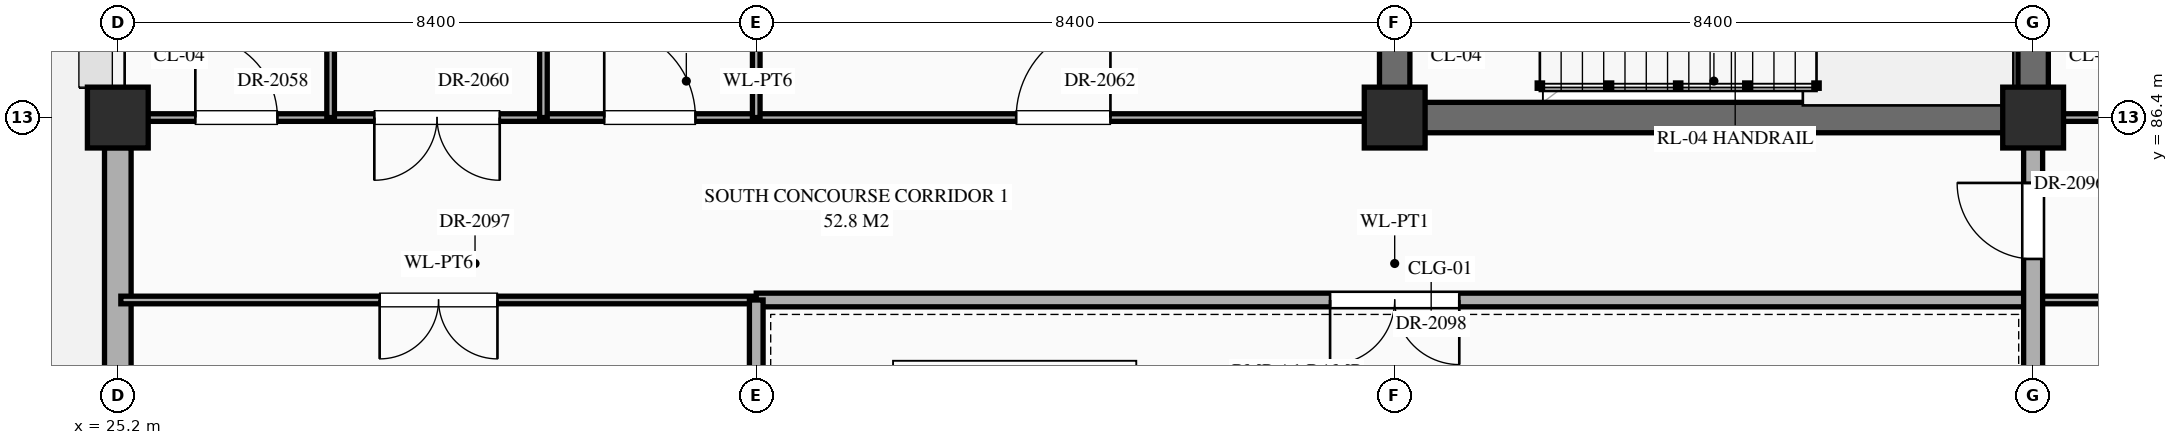
"""IFC4 building model, lengths in metres.
Left out: names, types, materials, properties, quantities, classifications, styles, units other than length and angle.
Written with IfcOpenShell. Run it as: python <this file> out.ifc"""

import sys

from ifc_helpers import new_model, si_unit, direction, frame, frame_2d, origin, origin_2d, place, context, subcontext, project, spatial, rectangle, extrude, element, fill, save


model = new_model("IFC4")
c1 = context("Model", 3, precision=1e-05, world=origin(), true_north=direction((0.0, 1.0)))
c2 = subcontext(c1, "Body", "Model", "MODEL_VIEW")
j1 = project(units=[si_unit("LENGTHUNIT", "METRE"), si_unit("PLANEANGLEUNIT", "RADIAN")], contexts=[c1])
p1 = place(None, origin())
s1 = spatial("IfcSite", under=j1, at=p1, CompositionType="ELEMENT")
p2 = place(p1, origin())
s2 = spatial("IfcBuilding", under=s1, at=p2, CompositionType="ELEMENT")
p3 = place(p2, frame((0.0, 0.0, 21.6)))
s3 = spatial("IfcBuildingStorey", under=s2, at=p3, CompositionType="ELEMENT", Elevation=21.6)
for number, where, z_axis, x_axis in (
    (1, (25.2, 86.4, 0.0), (0.0, 0.0, 1.0), (1.0, 0.0, 0.0)),
    (2, (42.0, 86.4, 0.0), (0.0, 0.0, 1.0), (1.0, 0.0, 0.0)),
    (3, (50.4, 86.4, 0.0), (0.0, 0.0, 1.0), (1.0, 0.0, 0.0)),
):
    element("IfcColumn", number, at=place(p3, frame(where, z_axis=z_axis, x_axis=x_axis)), inside=s3, PredefinedType="COLUMN", context=c2, shape_type="SweptSolid", body=[
        extrude(rectangle(XDim=0.8, YDim=0.8, at=origin_2d()), origin(), (0.0, 0.0, 1.0), 4.5),
    ])
p4 = place(p3, frame((25.2, 79.595, 0.0), z_axis=(0.0, 0.0, 1.0), x_axis=(0.0, 1.0, 0.0)))
e4 = element("IfcWall", 4, at=p4, inside=s3, PredefinedType="STANDARD", context=c2, shape_type="SweptSolid", body=[
    extrude(rectangle(XDim=6.41, YDim=0.35, at=frame_2d((3.205, 0.0))), origin(), (0.0, 0.0, 1.0), 3.59),
])
p5 = place(p4, frame((1.105, 0.0, 0.0)))
e5 = element("IfcOpeningElement", 5, at=p5, cuts=e4, PredefinedType="OPENING", context=c2, shape_type="SweptSolid", body=[
    extrude(rectangle(XDim=1.8, YDim=2.25, at=frame_2d((0.9, 1.125))), frame((0.0, 0.187, 0.0), z_axis=(0.0, -1.0, 0.0), x_axis=(1.0, 0.0, 0.0)), (0.0, 0.0, 1.0), 0.374),
])
p6 = place(p3, frame((25.24, 84.0, 0.0), z_axis=(0.0, 0.0, 1.0), x_axis=(1.0, 0.0, 0.0)))
e6 = element("IfcWall", 6, at=p6, inside=s3, PredefinedType="STANDARD", context=c2, shape_type="SweptSolid", body=[
    extrude(rectangle(XDim=8.36, YDim=0.1, at=frame_2d((4.18, 0.0))), origin(), (0.0, 0.0, 1.0), 4.24),
])
p7 = place(p6, frame((3.405, 0.0, 0.0)))
e7 = element("IfcOpeningElement", 7, at=p7, cuts=e6, PredefinedType="OPENING", context=c2, shape_type="SweptSolid", body=[
    extrude(rectangle(XDim=1.55, YDim=2.35, at=frame_2d((0.775, 1.175))), frame((0.0, 0.062, 0.0), z_axis=(0.0, -1.0, 0.0), x_axis=(1.0, 0.0, 0.0)), (0.0, 0.0, 1.0), 0.124),
])
p8 = place(p3, frame((33.6, 84.0, 0.0), z_axis=(0.0, 0.0, 1.0), x_axis=(1.0, 0.0, 0.0)))
e8 = element("IfcWall", 8, at=p8, inside=s3, PredefinedType="STANDARD", context=c2, shape_type="SweptSolid", body=[
    extrude(rectangle(XDim=16.8, YDim=0.18, at=frame_2d((8.4, 0.0))), origin(), (0.0, 0.0, 1.0), 4.24),
])
p9 = place(p8, frame((7.55, 0.0, 0.0)))
e9 = element("IfcOpeningElement", 9, at=p9, cuts=e8, PredefinedType="OPENING", context=c2, shape_type="SweptSolid", body=[
    extrude(rectangle(XDim=1.7, YDim=2.45, at=frame_2d((0.85, 1.225))), frame((0.0, 0.102, 0.0), z_axis=(0.0, -1.0, 0.0), x_axis=(1.0, 0.0, 0.0)), (0.0, 0.0, 1.0), 0.204),
])
p10 = place(p3, frame((50.4, 84.0, 0.0), z_axis=(0.0, 0.0, 1.0), x_axis=(1.0, 0.0, 0.0)))
e10 = element("IfcWall", 10, at=p10, inside=s3, PredefinedType="STANDARD", context=c2, shape_type="SweptSolid", body=[
    extrude(rectangle(XDim=16.8, YDim=0.1, at=frame_2d((8.4, 0.0))), origin(), (0.0, 0.0, 1.0), 4.24),
])
p11 = place(p10, frame((3.69, 0.0, 0.0)))
e11 = element("IfcOpeningElement", 11, at=p11, cuts=e10, PredefinedType="OPENING", context=c2, shape_type="SweptSolid", body=[
    extrude(rectangle(XDim=1.02, YDim=2.4, at=frame_2d((0.51, 1.2))), frame((0.0, 0.062, 0.0), z_axis=(0.0, -1.0, 0.0), x_axis=(1.0, 0.0, 0.0)), (0.0, 0.0, 1.0), 0.124),
])
p12 = place(p10, frame((12.07, 0.0, 0.0)))
e12 = element("IfcOpeningElement", 12, at=p12, cuts=e10, PredefinedType="OPENING", context=c2, shape_type="SweptSolid", body=[
    extrude(rectangle(XDim=1.06, YDim=2.4, at=frame_2d((0.53, 1.2))), frame((0.0, 0.062, 0.0), z_axis=(0.0, -1.0, 0.0), x_axis=(1.0, 0.0, 0.0)), (0.0, 0.0, 1.0), 0.124),
])
p13 = place(p3, frame((25.24, 86.4, 0.0), z_axis=(0.0, 0.0, 1.0), x_axis=(1.0, 0.0, 0.0)))
e13 = element("IfcWall", 13, at=p13, inside=s3, PredefinedType="STANDARD", context=c2, shape_type="SweptSolid", body=[
    extrude(rectangle(XDim=16.76, YDim=0.1, at=frame_2d((8.38, 0.0))), origin(), (0.0, 0.0, 1.0), 3.19),
])
p14 = place(p13, frame((0.98, 0.0, 0.0)))
e14 = element("IfcOpeningElement", 14, at=p14, cuts=e13, PredefinedType="OPENING", context=c2, shape_type="SweptSolid", body=[
    extrude(rectangle(XDim=1.08, YDim=2.25, at=frame_2d((0.54, 1.125))), frame((0.0, 0.062, 0.0), z_axis=(0.0, -1.0, 0.0), x_axis=(1.0, 0.0, 0.0)), (0.0, 0.0, 1.0), 0.124),
])
p15 = place(p13, frame((3.335, 0.0, 0.0)))
e15 = element("IfcOpeningElement", 15, at=p15, cuts=e13, PredefinedType="OPENING", context=c2, shape_type="SweptSolid", body=[
    extrude(rectangle(XDim=1.65, YDim=2.4, at=frame_2d((0.825, 1.2))), frame((0.0, 0.062, 0.0), z_axis=(0.0, -1.0, 0.0), x_axis=(1.0, 0.0, 0.0)), (0.0, 0.0, 1.0), 0.124),
])
p16 = place(p13, frame((6.36, 0.0, 0.0)))
e16 = element("IfcOpeningElement", 16, at=p16, cuts=e13, PredefinedType="OPENING", context=c2, shape_type="SweptSolid", body=[
    extrude(rectangle(XDim=1.2, YDim=2.35, at=frame_2d((0.6, 1.175))), frame((0.0, 0.062, 0.0), z_axis=(0.0, -1.0, 0.0), x_axis=(1.0, 0.0, 0.0)), (0.0, 0.0, 1.0), 0.124),
])
p17 = place(p13, frame((11.78, 0.0, 0.0)))
e17 = element("IfcOpeningElement", 17, at=p17, cuts=e13, PredefinedType="OPENING", context=c2, shape_type="SweptSolid", body=[
    extrude(rectangle(XDim=1.24, YDim=2.3, at=frame_2d((0.62, 1.15))), frame((0.0, 0.062, 0.0), z_axis=(0.0, -1.0, 0.0), x_axis=(1.0, 0.0, 0.0)), (0.0, 0.0, 1.0), 0.124),
])
p18 = place(p3, frame((42.0, 86.4, 0.0), z_axis=(0.0, 0.0, 1.0), x_axis=(1.0, 0.0, 0.0)))
e18 = element("IfcWall", 18, at=p18, inside=s3, PredefinedType="SHEAR", context=c2, shape_type="SweptSolid", body=[
    extrude(rectangle(XDim=8.4, YDim=0.4, at=frame_2d((4.2, 0.0))), origin(), (0.0, 0.0, 1.0), 4.24),
])
p19 = place(p3, frame((50.4, 86.4, 0.0), z_axis=(0.0, 0.0, 1.0), x_axis=(1.0, 0.0, 0.0)))
e19 = element("IfcWall", 19, at=p19, inside=s3, PredefinedType="STANDARD", context=c2, shape_type="SweptSolid", body=[
    extrude(rectangle(XDim=8.4, YDim=0.1, at=frame_2d((4.2, 0.0))), origin(), (0.0, 0.0, 1.0), 3.39),
])
p20 = place(p19, frame((1.09, 0.0, 0.0)))
e20 = element("IfcOpeningElement", 20, at=p20, cuts=e19, PredefinedType="OPENING", context=c2, shape_type="SweptSolid", body=[
    extrude(rectangle(XDim=0.94, YDim=2.3, at=frame_2d((0.47, 1.15))), frame((0.0, 0.062, 0.0), z_axis=(0.0, -1.0, 0.0), x_axis=(1.0, 0.0, 0.0)), (0.0, 0.0, 1.0), 0.124),
])
p21 = place(p19, frame((3.69, 0.0, 0.0)))
e21 = element("IfcOpeningElement", 21, at=p21, cuts=e19, PredefinedType="OPENING", context=c2, shape_type="SweptSolid", body=[
    extrude(rectangle(XDim=1.02, YDim=2.4, at=frame_2d((0.51, 1.2))), frame((0.0, 0.062, 0.0), z_axis=(0.0, -1.0, 0.0), x_axis=(1.0, 0.0, 0.0)), (0.0, 0.0, 1.0), 0.124),
])
p22 = place(p19, frame((6.31, 0.0, 0.0)))
e22 = element("IfcOpeningElement", 22, at=p22, cuts=e19, PredefinedType="OPENING", context=c2, shape_type="SweptSolid", body=[
    extrude(rectangle(XDim=1.06, YDim=2.4, at=frame_2d((0.53, 1.2))), frame((0.0, 0.062, 0.0), z_axis=(0.0, -1.0, 0.0), x_axis=(1.0, 0.0, 0.0)), (0.0, 0.0, 1.0), 0.124),
])
p23 = place(p3, frame((28.0, 86.4, 0.0), z_axis=(0.0, 0.0, 1.0), x_axis=(0.0, 1.0, 0.0)))
e23 = element("IfcWall", 23, at=p23, inside=s3, PredefinedType="STANDARD", context=c2, shape_type="SweptSolid", body=[
    extrude(rectangle(XDim=7.2, YDim=0.1, at=frame_2d((3.6, 0.0))), origin(), (0.0, 0.0, 1.0), 4.24),
])
p24 = place(p23, frame((3.08, 0.0, 0.0)))
e24 = element("IfcOpeningElement", 24, at=p24, cuts=e23, PredefinedType="OPENING", context=c2, shape_type="SweptSolid", body=[
    extrude(rectangle(XDim=1.04, YDim=2.2, at=frame_2d((0.52, 1.1))), frame((0.0, 0.062, 0.0), z_axis=(0.0, -1.0, 0.0), x_axis=(1.0, 0.0, 0.0)), (0.0, 0.0, 1.0), 0.124),
])
p25 = place(p3, frame((30.8, 86.4, 0.0), z_axis=(0.0, 0.0, 1.0), x_axis=(0.0, 1.0, 0.0)))
e25 = element("IfcWall", 25, at=p25, inside=s3, PredefinedType="STANDARD", context=c2, shape_type="SweptSolid", body=[
    extrude(rectangle(XDim=7.2, YDim=0.1, at=frame_2d((3.6, 0.0))), origin(), (0.0, 0.0, 1.0), 4.24),
])
p26 = place(p25, frame((3.04, 0.0, 0.0)))
e26 = element("IfcOpeningElement", 26, at=p26, cuts=e25, PredefinedType="OPENING", context=c2, shape_type="SweptSolid", body=[
    extrude(rectangle(XDim=1.12, YDim=2.25, at=frame_2d((0.56, 1.125))), frame((0.0, 0.062, 0.0), z_axis=(0.0, -1.0, 0.0), x_axis=(1.0, 0.0, 0.0)), (0.0, 0.0, 1.0), 0.124),
])
p27 = place(p3, frame((33.6, 79.24, 0.0), z_axis=(0.0, 0.0, 1.0), x_axis=(0.0, 1.0, 0.0)))
e27 = element("IfcWall", 27, at=p27, inside=s3, PredefinedType="STANDARD", context=c2, shape_type="SweptSolid", body=[
    extrude(rectangle(XDim=4.76, YDim=0.18, at=frame_2d((2.38, 0.0))), origin(), (0.0, 0.0, 1.0), 4.24),
])
p28 = place(p27, frame((1.745, 0.0, 0.0)))
e28 = element("IfcOpeningElement", 28, at=p28, cuts=e27, PredefinedType="OPENING", context=c2, shape_type="SweptSolid", body=[
    extrude(rectangle(XDim=1.55, YDim=2.35, at=frame_2d((0.775, 1.175))), frame((0.0, 0.102, 0.0), z_axis=(0.0, -1.0, 0.0), x_axis=(1.0, 0.0, 0.0)), (0.0, 0.0, 1.0), 0.204),
])
p29 = place(p3, frame((33.6, 86.4, 0.0), z_axis=(0.0, 0.0, 1.0), x_axis=(0.0, 1.0, 0.0)))
e29 = element("IfcWall", 29, at=p29, inside=s3, PredefinedType="STANDARD", context=c2, shape_type="SweptSolid", body=[
    extrude(rectangle(XDim=7.2, YDim=0.1, at=frame_2d((3.6, 0.0))), origin(), (0.0, 0.0, 1.0), 4.24),
])
p30 = place(p3, frame((42.0, 86.4, 0.0), z_axis=(0.0, 0.0, 1.0), x_axis=(0.0, 1.0, 0.0)))
e30 = element("IfcWall", 30, at=p30, inside=s3, PredefinedType="SHEAR", context=c2, shape_type="SweptSolid", body=[
    extrude(rectangle(XDim=4.8, YDim=0.4, at=frame_2d((2.4, 0.0))), origin(), (0.0, 0.0, 1.0), 4.24),
])
p31 = place(p3, frame((50.4, 79.24, 0.0), z_axis=(0.0, 0.0, 1.0), x_axis=(0.0, 1.0, 0.0)))
e31 = element("IfcWall", 31, at=p31, inside=s3, PredefinedType="STANDARD", context=c2, shape_type="SweptSolid", body=[
    extrude(rectangle(XDim=7.16, YDim=0.25, at=frame_2d((3.58, 0.0))), origin(), (0.0, 0.0, 1.0), 3.49),
])
p32 = place(p31, frame((5.3, 0.0, 0.0)))
e32 = element("IfcOpeningElement", 32, at=p32, cuts=e31, PredefinedType="OPENING", context=c2, shape_type="SweptSolid", body=[
    extrude(rectangle(XDim=1.0, YDim=2.2, at=frame_2d((0.5, 1.1))), frame((0.0, 0.137, 0.0), z_axis=(0.0, -1.0, 0.0), x_axis=(1.0, 0.0, 0.0)), (0.0, 0.0, 1.0), 0.274),
])
p33 = place(p3, frame((50.4, 86.4, 0.0), z_axis=(0.0, 0.0, 1.0), x_axis=(0.0, 1.0, 0.0)))
e33 = element("IfcWall", 33, at=p33, inside=s3, PredefinedType="SHEAR", context=c2, shape_type="SweptSolid", body=[
    extrude(rectangle(XDim=4.8, YDim=0.4, at=frame_2d((2.4, 0.0))), origin(), (0.0, 0.0, 1.0), 4.24),
])
p34 = place(p14, origin())
e34 = element("IfcDoor", 34, at=p34, inside=s3, OperationType="SINGLE_SWING_LEFT", PredefinedType="DOOR", context=c2, shape_type="SweptSolid", body=[
    extrude(rectangle(XDim=1.08, YDim=2.25, at=frame_2d((0.54, 1.125))), frame((0.0, 0.025, 0.0), z_axis=(0.0, -1.0, 0.0), x_axis=(1.0, 0.0, 0.0)), (0.0, 0.0, 1.0), 0.05),
])
fill(e14, e34)
p35 = place(p15, frame((1.65, 0.0, 0.0), z_axis=(0.0, 0.0, 1.0), x_axis=(-1.0, 0.0, 0.0)))
e35 = element("IfcDoor", 35, at=p35, inside=s3, OperationType="DOUBLE_DOOR_SINGLE_SWING", PredefinedType="DOOR", context=c2, shape_type="SweptSolid", body=[
    extrude(rectangle(XDim=1.65, YDim=2.4, at=frame_2d((0.825, 1.2))), frame((0.0, 0.025, 0.0), z_axis=(0.0, -1.0, 0.0), x_axis=(1.0, 0.0, 0.0)), (0.0, 0.0, 1.0), 0.05),
])
fill(e15, e35)
p36 = place(p16, origin())
e36 = element("IfcDoor", 36, at=p36, inside=s3, OperationType="SINGLE_SWING_LEFT", PredefinedType="DOOR", context=c2, shape_type="SweptSolid", body=[
    extrude(rectangle(XDim=1.2, YDim=2.35, at=frame_2d((0.6, 1.175))), frame((0.0, 0.025, 0.0), z_axis=(0.0, -1.0, 0.0), x_axis=(1.0, 0.0, 0.0)), (0.0, 0.0, 1.0), 0.05),
])
fill(e16, e36)
p37 = place(p17, origin())
e37 = element("IfcDoor", 37, at=p37, inside=s3, OperationType="SINGLE_SWING_RIGHT", PredefinedType="DOOR", context=c2, shape_type="SweptSolid", body=[
    extrude(rectangle(XDim=1.24, YDim=2.3, at=frame_2d((0.62, 1.15))), frame((0.0, 0.025, 0.0), z_axis=(0.0, -1.0, 0.0), x_axis=(1.0, 0.0, 0.0)), (0.0, 0.0, 1.0), 0.05),
])
fill(e17, e37)
p38 = place(p32, origin())
e38 = element("IfcDoor", 38, at=p38, inside=s3, OperationType="SINGLE_SWING_RIGHT", PredefinedType="DOOR", context=c2, shape_type="SweptSolid", body=[
    extrude(rectangle(XDim=1.0, YDim=2.2, at=frame_2d((0.5, 1.1))), frame((0.0, 0.025, 0.0), z_axis=(0.0, -1.0, 0.0), x_axis=(1.0, 0.0, 0.0)), (0.0, 0.0, 1.0), 0.05),
])
fill(e32, e38)
p39 = place(p7, frame((1.55, 0.0, 0.0), z_axis=(0.0, 0.0, 1.0), x_axis=(-1.0, 0.0, 0.0)))
e39 = element("IfcDoor", 39, at=p39, inside=s3, OperationType="DOUBLE_DOOR_SINGLE_SWING", PredefinedType="DOOR", context=c2, shape_type="SweptSolid", body=[
    extrude(rectangle(XDim=1.55, YDim=2.35, at=frame_2d((0.775, 1.175))), frame((0.0, 0.025, 0.0), z_axis=(0.0, -1.0, 0.0), x_axis=(1.0, 0.0, 0.0)), (0.0, 0.0, 1.0), 0.05),
])
fill(e7, e39)
p40 = place(p9, frame((1.7, 0.0, 0.0), z_axis=(0.0, 0.0, 1.0), x_axis=(-1.0, 0.0, 0.0)))
e40 = element("IfcDoor", 40, at=p40, inside=s3, OperationType="DOUBLE_DOOR_SINGLE_SWING", PredefinedType="DOOR", context=c2, shape_type="SweptSolid", body=[
    extrude(rectangle(XDim=1.7, YDim=2.45, at=frame_2d((0.85, 1.225))), frame((0.0, 0.025, 0.0), z_axis=(0.0, -1.0, 0.0), x_axis=(1.0, 0.0, 0.0)), (0.0, 0.0, 1.0), 0.05),
])
fill(e9, e40)
save(model, sys.argv[1])
